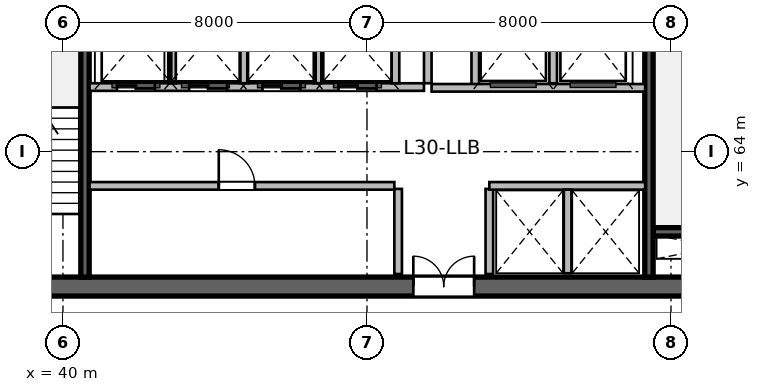
"""IFC4 building model, lengths in metres.
Left out: names, types, materials, properties, quantities, classifications, styles, units other than length and angle.
Written with IfcOpenShell. Run it as: python <this file> out.ifc"""

import sys

from ifc_helpers import new_model, si_unit, direction, frame, frame_2d, origin, place, context, subcontext, project, spatial, rectangle, extrude, source, transform, mapped, element, fill, save


model = new_model("IFC4")
c1 = context("Model", 3, precision=1e-05, world=origin(), true_north=direction((0.0, 1.0)))
c2 = subcontext(c1, "Body", "Model", "MODEL_VIEW")
j1 = project(units=[si_unit("LENGTHUNIT", "METRE"), si_unit("PLANEANGLEUNIT", "RADIAN")], contexts=[c1])
p1 = place(None, origin())
s1 = spatial("IfcSite", under=j1, at=p1, CompositionType="ELEMENT")
p2 = place(p1, origin())
s2 = spatial("IfcBuilding", under=s1, at=p2, CompositionType="ELEMENT")
p3 = place(p2, frame((0.0, 0.0, 127.2)))
s3 = spatial("IfcBuildingStorey", under=s2, at=p3, CompositionType="ELEMENT", Elevation=127.2)
m1 = source(origin(), c2, "Body", "SweptSolid", [
    extrude(rectangle(XDim=21.6, YDim=0.5, at=frame_2d((10.8, 0.0))), origin(), (0.0, 0.0, 1.0), 3.9),
])
p4 = place(p3, frame((37.2, 60.45, 0.0), z_axis=(0.0, 0.0, 1.0), x_axis=(1.0, 0.0, 0.0)))
e1 = element("IfcWall", 1, at=p4, inside=s3, PredefinedType="SHEAR", context=c2, shape_type="MappedRepresentation", body=[
    mapped(m1, transform((0.0, 0.0, 0.0), scale=1.0)),
])
p5 = place(p4, frame((1.1, 0.0, 0.0)))
e2 = element("IfcOpeningElement", 2, at=p5, cuts=e1, PredefinedType="OPENING", context=c2, shape_type="SweptSolid", body=[
    extrude(rectangle(XDim=1.15, YDim=2.15, at=frame_2d((0.575, 1.075))), frame((0.0, 0.26, 0.0), z_axis=(0.0, -1.0, 0.0), x_axis=(1.0, 0.0, 0.0)), (0.0, 0.0, 1.0), 0.52),
])
p6 = place(p4, frame((19.5, 0.0, 0.0)))
e3 = element("IfcOpeningElement", 3, at=p6, cuts=e1, PredefinedType="OPENING", context=c2, shape_type="SweptSolid", body=[
    extrude(rectangle(XDim=0.9, YDim=2.1, at=frame_2d((0.45, 1.05))), frame((0.0, 0.26, 0.0), z_axis=(0.0, -1.0, 0.0), x_axis=(1.0, 0.0, 0.0)), (0.0, 0.0, 1.0), 0.52),
])
p7 = place(p4, frame((12.02, 0.0, 0.0)))
e4 = element("IfcOpeningElement", 4, at=p7, cuts=e1, PredefinedType="OPENING", context=c2, shape_type="SweptSolid", body=[
    extrude(rectangle(XDim=1.6, YDim=2.15, at=frame_2d((0.8, 1.075))), frame((0.0, 0.26, 0.0), z_axis=(0.0, -1.0, 0.0), x_axis=(1.0, 0.0, 0.0)), (0.0, 0.0, 1.0), 0.52),
])
m2 = source(origin(), c2, "Body", "SweptSolid", [
    extrude(rectangle(XDim=3.27, YDim=0.22, at=frame_2d((1.635, 0.0))), origin(), (0.0, 0.0, 1.0), 3.9),
])
p8 = place(p3, frame((55.53, 61.89, 0.0), z_axis=(0.0, 0.0, 1.0), x_axis=(1.0, 0.0, 0.0)))
e5 = element("IfcWall", 5, at=p8, inside=s3, PredefinedType="SHEAR", context=c2, shape_type="MappedRepresentation", body=[
    mapped(m2, transform((0.0, 0.0, 0.0), scale=1.0)),
])
m3 = source(origin(), c2, "Body", "SweptSolid", [
    extrude(rectangle(XDim=11.0, YDim=0.22, at=frame_2d((5.5, 0.0))), origin(), (0.0, 0.0, 1.0), 3.9),
])
p9 = place(p3, frame((40.58, 60.7, 0.0), z_axis=(0.0, 0.0, 1.0), x_axis=(0.0, 1.0, 0.0)))
e6 = element("IfcWall", 6, at=p9, inside=s3, PredefinedType="SHEAR", context=c2, shape_type="MappedRepresentation", body=[
    mapped(m3, transform((0.0, 0.0, 0.0), scale=1.0)),
])
p10 = place(p3, frame((55.42, 60.7, 0.0), z_axis=(0.0, 0.0, 1.0), x_axis=(0.0, 1.0, 0.0)))
e7 = element("IfcWall", 7, at=p10, inside=s3, PredefinedType="SHEAR", context=c2, shape_type="MappedRepresentation", body=[
    mapped(m3, transform((0.0, 0.0, 0.0), scale=1.0)),
])
p11 = place(p10, frame((9.545, 0.0, 0.0)))
e8 = element("IfcOpeningElement", 8, at=p11, cuts=e7, PredefinedType="OPENING", context=c2, shape_type="SweptSolid", body=[
    extrude(rectangle(XDim=1.15, YDim=2.15, at=frame_2d((0.575, 1.075))), frame((0.0, 0.12, 0.0), z_axis=(0.0, -1.0, 0.0), x_axis=(1.0, 0.0, 0.0)), (0.0, 0.0, 1.0), 0.24),
])
m4 = source(origin(), c2, "Body", "SweptSolid", [
    extrude(rectangle(XDim=2.24, YDim=0.2, at=frame_2d((1.12, 0.0))), origin(), (0.0, 0.0, 1.0), 3.65),
])
for number, where, z_axis, x_axis in (
    (9, (48.82, 60.78, 0.0), (0.0, 0.0, 1.0), (0.0, 1.0, 0.0)),
    (10, (51.22, 60.78, 0.0), (0.0, 0.0, 1.0), (0.0, 1.0, 0.0)),
):
    element("IfcWall", number, at=place(p3, frame(where, z_axis=z_axis, x_axis=x_axis)), inside=s3, PredefinedType="SOLIDWALL", context=c2, shape_type="MappedRepresentation", body=[
        mapped(m4, transform((0.0, 0.0, 0.0), scale=1.0)),
    ])
m5 = source(origin(), c2, "Body", "SweptSolid", [
    extrude(rectangle(XDim=5.8, YDim=0.2, at=frame_2d((2.9, 0.0))), origin(), (0.0, 0.0, 1.0), 3.65),
])
p12 = place(p3, frame((49.6, 65.8, 0.0), z_axis=(0.0, 0.0, 1.0), x_axis=(0.0, 1.0, 0.0)))
e11 = element("IfcWall", 11, at=p12, inside=s3, PredefinedType="SOLIDWALL", context=c2, shape_type="MappedRepresentation", body=[
    mapped(m5, transform((0.0, 0.0, 0.0), scale=1.0)),
])
m6 = source(origin(), c2, "Body", "SweptSolid", [
    extrude(rectangle(XDim=2.58, YDim=0.2, at=frame_2d((1.29, 0.0))), origin(), (0.0, 0.0, 1.0), 3.65),
])
p13 = place(p3, frame((50.85, 65.68, 0.0), z_axis=(0.0, 0.0, 1.0), x_axis=(0.0, 1.0, 0.0)))
e12 = element("IfcWall", 12, at=p13, inside=s3, PredefinedType="SOLIDWALL", context=c2, shape_type="MappedRepresentation", body=[
    mapped(m6, transform((0.0, 0.0, 0.0), scale=1.0)),
])
m7 = source(origin(), c2, "Body", "SweptSolid", [
    extrude(rectangle(XDim=2.4, YDim=0.2, at=frame_2d((1.2, 0.0))), origin(), (0.0, 0.0, 1.0), 3.65),
])
p14 = place(p3, frame((52.9, 65.8, 0.0), z_axis=(0.0, 0.0, 1.0), x_axis=(0.0, 1.0, 0.0)))
e13 = element("IfcWall", 13, at=p14, inside=s3, PredefinedType="SOLIDWALL", context=c2, shape_type="MappedRepresentation", body=[
    mapped(m7, transform((0.0, 0.0, 0.0), scale=1.0)),
])
m8 = source(origin(), c2, "Body", "SweptSolid", [
    extrude(rectangle(XDim=5.62, YDim=0.2, at=frame_2d((2.81, 0.0))), origin(), (0.0, 0.0, 1.0), 3.65),
])
p15 = place(p3, frame((49.7, 65.68, 0.0), z_axis=(0.0, 0.0, 1.0), x_axis=(1.0, 0.0, 0.0)))
e14 = element("IfcWall", 14, at=p15, inside=s3, PredefinedType="SOLIDWALL", context=c2, shape_type="MappedRepresentation", body=[
    mapped(m8, transform((0.0, 0.0, 0.0), scale=1.0)),
])
m9 = source(origin(), c2, "Body", "SweptSolid", [
    extrude(rectangle(XDim=8.02, YDim=0.2, at=frame_2d((4.01, 0.0))), origin(), (0.0, 0.0, 1.0), 3.65),
])
p16 = place(p3, frame((40.7, 63.1, 0.0), z_axis=(0.0, 0.0, 1.0), x_axis=(1.0, 0.0, 0.0)))
e15 = element("IfcWall", 15, at=p16, inside=s3, PredefinedType="SOLIDWALL", context=c2, shape_type="MappedRepresentation", body=[
    mapped(m9, transform((0.0, 0.0, 0.0), scale=1.0)),
])
p17 = place(p16, frame((3.4, 0.0, 0.0)))
e16 = element("IfcOpeningElement", 16, at=p17, cuts=e15, PredefinedType="OPENING", context=c2, shape_type="SweptSolid", body=[
    extrude(rectangle(XDim=0.95, YDim=2.15, at=frame_2d((0.475, 1.075))), frame((0.0, 0.11, 0.0), z_axis=(0.0, -1.0, 0.0), x_axis=(1.0, 0.0, 0.0)), (0.0, 0.0, 1.0), 0.22),
])
m10 = source(origin(), c2, "Body", "SweptSolid", [
    extrude(rectangle(XDim=4.1, YDim=0.2, at=frame_2d((2.05, 0.0))), origin(), (0.0, 0.0, 1.0), 3.65),
])
p18 = place(p3, frame((51.22, 63.1, 0.0), z_axis=(0.0, 0.0, 1.0), x_axis=(1.0, 0.0, 0.0)))
e17 = element("IfcWall", 17, at=p18, inside=s3, PredefinedType="SOLIDWALL", context=c2, shape_type="MappedRepresentation", body=[
    mapped(m10, transform((0.0, 0.0, 0.0), scale=1.0)),
])
m11 = source(origin(), c2, "Body", "SweptSolid", [
    extrude(rectangle(XDim=2.2, YDim=0.2, at=frame_2d((1.1, 0.0))), origin(), (0.0, 0.0, 1.0), 3.65),
])
p19 = place(p3, frame((53.28, 60.8, 0.0), z_axis=(0.0, 0.0, 1.0), x_axis=(0.0, 1.0, 0.0)))
e18 = element("IfcWall", 18, at=p19, inside=s3, PredefinedType="SOLIDWALL", context=c2, shape_type="MappedRepresentation", body=[
    mapped(m11, transform((0.0, 0.0, 0.0), scale=1.0)),
])
m12 = source(origin(), c2, "Body", "SweptSolid", [
    extrude(rectangle(XDim=8.8, YDim=0.2, at=frame_2d((4.4, 0.0))), origin(), (0.0, 0.0, 1.0), 3.65),
])
p20 = place(p3, frame((40.7, 65.7, 0.0), z_axis=(0.0, 0.0, 1.0), x_axis=(1.0, 0.0, 0.0)))
e19 = element("IfcWall", 19, at=p20, inside=s3, PredefinedType="SOLIDWALL", context=c2, shape_type="MappedRepresentation", body=[
    mapped(m12, transform((0.0, 0.0, 0.0), scale=1.0)),
])
p21 = place(p20, frame((0.72, 0.0, 0.0)))
e20 = element("IfcOpeningElement", 20, at=p21, cuts=e19, PredefinedType="OPENING", context=c2, shape_type="SweptSolid", body=[
    extrude(rectangle(XDim=1.0, YDim=2.15, at=frame_2d((0.5, 1.075))), frame((0.0, 0.11, 0.0), z_axis=(0.0, -1.0, 0.0), x_axis=(1.0, 0.0, 0.0)), (0.0, 0.0, 1.0), 0.22),
])
p22 = place(p20, frame((2.62, 0.0, 0.0)))
e21 = element("IfcOpeningElement", 21, at=p22, cuts=e19, PredefinedType="OPENING", context=c2, shape_type="SweptSolid", body=[
    extrude(rectangle(XDim=1.0, YDim=2.15, at=frame_2d((0.5, 1.075))), frame((0.0, 0.11, 0.0), z_axis=(0.0, -1.0, 0.0), x_axis=(1.0, 0.0, 0.0)), (0.0, 0.0, 1.0), 0.22),
])
p23 = place(p20, frame((4.55, 0.0, 0.0)))
e22 = element("IfcOpeningElement", 22, at=p23, cuts=e19, PredefinedType="OPENING", context=c2, shape_type="SweptSolid", body=[
    extrude(rectangle(XDim=1.0, YDim=2.15, at=frame_2d((0.5, 1.075))), frame((0.0, 0.11, 0.0), z_axis=(0.0, -1.0, 0.0), x_axis=(1.0, 0.0, 0.0)), (0.0, 0.0, 1.0), 0.22),
])
p24 = place(p20, frame((6.55, 0.0, 0.0)))
e23 = element("IfcOpeningElement", 23, at=p24, cuts=e19, PredefinedType="OPENING", context=c2, shape_type="SweptSolid", body=[
    extrude(rectangle(XDim=1.0, YDim=2.15, at=frame_2d((0.5, 1.075))), frame((0.0, 0.11, 0.0), z_axis=(0.0, -1.0, 0.0), x_axis=(1.0, 0.0, 0.0)), (0.0, 0.0, 1.0), 0.22),
])
for number, where, z_axis, x_axis in (
    (24, (48.75, 65.8, 0.0), (0.0, 0.0, 1.0), (0.0, 1.0, 0.0)),
    (25, (42.87, 65.8, 0.0), (0.0, 0.0, 1.0), (0.0, 1.0, 0.0)),
    (26, (44.77, 65.8, 0.0), (0.0, 0.0, 1.0), (0.0, 1.0, 0.0)),
    (27, (46.7, 65.8, 0.0), (0.0, 0.0, 1.0), (0.0, 1.0, 0.0)),
):
    element("IfcWall", number, at=place(p3, frame(where, z_axis=z_axis, x_axis=x_axis)), inside=s3, PredefinedType="SOLIDWALL", context=c2, shape_type="MappedRepresentation", body=[
        mapped(m7, transform((0.0, 0.0, 0.0), scale=1.0)),
    ])
m13 = source(origin(), c2, "Body", "SweptSolid", [
    extrude(rectangle(XDim=1.6, YDim=2.15, at=frame_2d((0.8, 1.075))), frame((0.0, 0.025, 0.0), z_axis=(0.0, -1.0, 0.0), x_axis=(1.0, 0.0, 0.0)), (0.0, 0.0, 1.0), 0.05),
])
p25 = place(p7, origin())
e28 = element("IfcDoor", 28, at=p25, inside=s3, OperationType="DOUBLE_DOOR_SINGLE_SWING", PredefinedType="DOOR", context=c2, shape_type="MappedRepresentation", body=[
    mapped(m13, transform((0.0, 0.0, 0.0), scale=1.0)),
])
fill(e4, e28)
m14 = source(origin(), c2, "Body", "SweptSolid", [
    extrude(rectangle(XDim=0.95, YDim=2.15, at=frame_2d((0.475, 1.075))), frame((0.0, 0.025, 0.0), z_axis=(0.0, -1.0, 0.0), x_axis=(1.0, 0.0, 0.0)), (0.0, 0.0, 1.0), 0.05),
])
p26 = place(p17, origin())
e29 = element("IfcDoor", 29, at=p26, inside=s3, OperationType="SINGLE_SWING_LEFT", PredefinedType="DOOR", context=c2, shape_type="MappedRepresentation", body=[
    mapped(m14, transform((0.0, 0.0, 0.0), scale=1.0)),
])
fill(e16, e29)
m15 = source(origin(), c2, "Body", "SweptSolid", [
    extrude(rectangle(XDim=1.0, YDim=2.15, at=frame_2d((0.5, 1.075))), frame((0.0, 0.025, 0.0), z_axis=(0.0, -1.0, 0.0), x_axis=(1.0, 0.0, 0.0)), (0.0, 0.0, 1.0), 0.05),
])
p27 = place(p21, origin())
e30 = element("IfcDoor", 30, at=p27, inside=s3, OperationType="DOUBLE_DOOR_SLIDING", PredefinedType="DOOR", context=c2, shape_type="MappedRepresentation", body=[
    mapped(m15, transform((0.0, 0.0, 0.0), scale=1.0)),
])
fill(e20, e30)
p28 = place(p22, origin())
e31 = element("IfcDoor", 31, at=p28, inside=s3, OperationType="DOUBLE_DOOR_SLIDING", PredefinedType="DOOR", context=c2, shape_type="MappedRepresentation", body=[
    mapped(m15, transform((0.0, 0.0, 0.0), scale=1.0)),
])
fill(e21, e31)
p29 = place(p23, origin())
e32 = element("IfcDoor", 32, at=p29, inside=s3, OperationType="DOUBLE_DOOR_SLIDING", PredefinedType="DOOR", context=c2, shape_type="MappedRepresentation", body=[
    mapped(m15, transform((0.0, 0.0, 0.0), scale=1.0)),
])
fill(e22, e32)
p30 = place(p24, origin())
e33 = element("IfcDoor", 33, at=p30, inside=s3, OperationType="DOUBLE_DOOR_SLIDING", PredefinedType="DOOR", context=c2, shape_type="MappedRepresentation", body=[
    mapped(m15, transform((0.0, 0.0, 0.0), scale=1.0)),
])
fill(e23, e33)
save(model, sys.argv[1])
